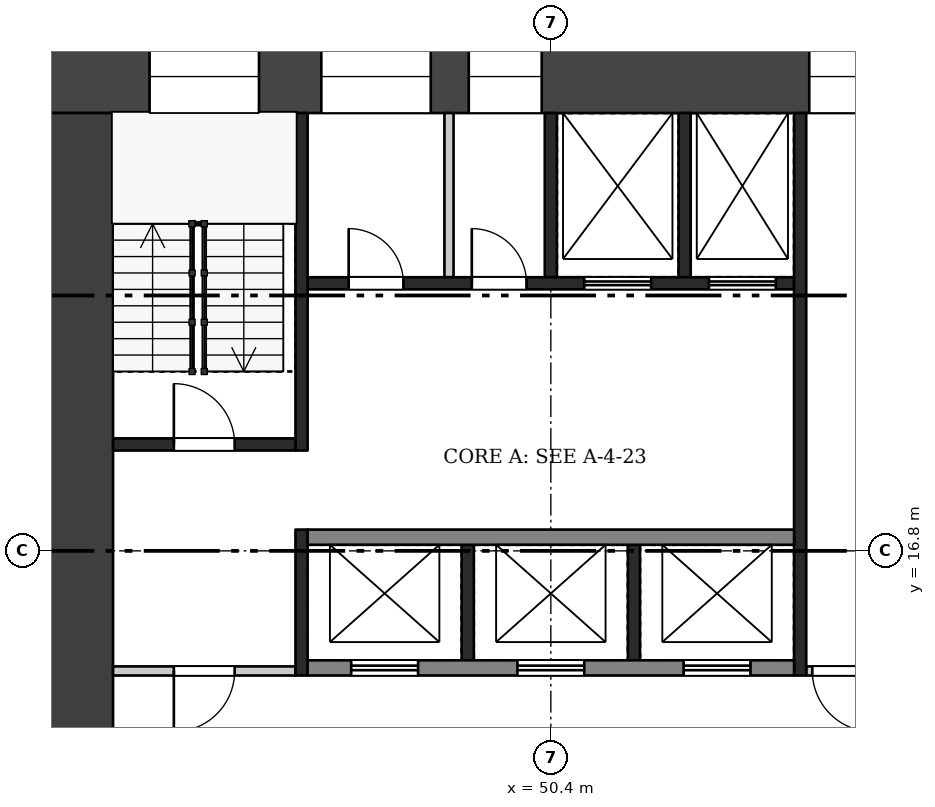
"""IFC4 building model, lengths in metres.
Left out: names, types, materials, properties, quantities, classifications, styles, units other than length and angle.
Written with IfcOpenShell. Run it as: python <this file> out.ifc"""

import sys

from ifc_helpers import new_model, si_unit, direction, frame, frame_2d, origin, place, context, subcontext, project, spatial, rectangle, extrude, element, fill, save


model = new_model("IFC4")
c1 = context("Model", 3, precision=1e-05, world=origin(), true_north=direction((0.0, 1.0)))
c2 = subcontext(c1, "Body", "Model", "MODEL_VIEW")
j1 = project(units=[si_unit("LENGTHUNIT", "METRE"), si_unit("PLANEANGLEUNIT", "RADIAN")], contexts=[c1])
p1 = place(None, origin())
s1 = spatial("IfcSite", under=j1, at=p1, CompositionType="ELEMENT")
p2 = place(p1, origin())
s2 = spatial("IfcBuilding", under=s1, at=p2, CompositionType="ELEMENT")
p3 = place(p2, frame((0.0, 0.0, 147.7)))
s3 = spatial("IfcBuildingStorey", under=s2, at=p3, CompositionType="ELEMENT", Elevation=147.7)
p4 = place(p3, frame((42.0, 24.6, 0.0), z_axis=(0.0, 0.0, 1.0), x_axis=(1.0, 0.0, 0.0)))
e1 = element("IfcWall", 1, at=p4, inside=s3, PredefinedType="SHEAR", context=c2, shape_type="SweptSolid", body=[
    extrude(rectangle(XDim=16.8, YDim=1.2, at=frame_2d((8.4, 0.0))), origin(), (0.0, 0.0, 1.0), 3.22),
])
p5 = place(p4, frame((1.8, 0.0, 0.5)))
e2 = element("IfcOpeningElement", 2, at=p5, cuts=e1, PredefinedType="OPENING", context=c2, shape_type="SweptSolid", body=[
    extrude(rectangle(XDim=1.8, YDim=2.4, at=frame_2d((0.9, 1.2))), frame((0.0, 0.61, 0.0), z_axis=(0.0, -1.0, 0.0), x_axis=(1.0, 0.0, 0.0)), (0.0, 0.0, 1.0), 1.22),
])
p6 = place(p4, frame((4.625, 0.0, 1.6)))
e3 = element("IfcOpeningElement", 3, at=p6, cuts=e1, PredefinedType="OPENING", context=c2, shape_type="SweptSolid", body=[
    extrude(rectangle(XDim=1.8, YDim=1.2, at=frame_2d((0.9, 0.6))), frame((0.0, 0.61, 0.0), z_axis=(0.0, -1.0, 0.0), x_axis=(1.0, 0.0, 0.0)), (0.0, 0.0, 1.0), 1.22),
])
p7 = place(p4, frame((7.05, 0.0, 1.6)))
e4 = element("IfcOpeningElement", 4, at=p7, cuts=e1, PredefinedType="OPENING", context=c2, shape_type="SweptSolid", body=[
    extrude(rectangle(XDim=1.2, YDim=1.2, at=frame_2d((0.6, 0.6))), frame((0.0, 0.61, 0.0), z_axis=(0.0, -1.0, 0.0), x_axis=(1.0, 0.0, 0.0)), (0.0, 0.0, 1.0), 1.22),
])
p8 = place(p4, frame((12.65, 0.0, 0.6)))
e5 = element("IfcOpeningElement", 5, at=p8, cuts=e1, PredefinedType="OPENING", context=c2, shape_type="SweptSolid", body=[
    extrude(rectangle(XDim=1.0, YDim=2.1, at=frame_2d((0.5, 1.05))), frame((0.0, 0.61, 0.0), z_axis=(0.0, -1.0, 0.0), x_axis=(1.0, 0.0, 0.0)), (0.0, 0.0, 1.0), 1.22),
])
p9 = place(p4, frame((14.175, 0.0, 1.6)))
e6 = element("IfcOpeningElement", 6, at=p9, cuts=e1, PredefinedType="OPENING", context=c2, shape_type="SweptSolid", body=[
    extrude(rectangle(XDim=1.2, YDim=1.2, at=frame_2d((0.6, 0.6))), frame((0.0, 0.61, 0.0), z_axis=(0.0, -1.0, 0.0), x_axis=(1.0, 0.0, 0.0)), (0.0, 0.0, 1.0), 1.22),
])
p10 = place(p3, frame((42.6, 9.6, 0.0), z_axis=(0.0, 0.0, 1.0), x_axis=(0.0, 1.0, 0.0)))
e7 = element("IfcWall", 7, at=p10, inside=s3, PredefinedType="SHEAR", context=c2, shape_type="SweptSolid", body=[
    extrude(rectangle(XDim=14.4, YDim=1.2, at=frame_2d((7.2, 0.0))), origin(), (0.0, 0.0, 1.0), 3.22),
])
p11 = place(p10, frame((2.1, 0.0, 0.0)))
e8 = element("IfcOpeningElement", 8, at=p11, cuts=e7, PredefinedType="OPENING", context=c2, shape_type="SweptSolid", body=[
    extrude(rectangle(XDim=1.8, YDim=2.1, at=frame_2d((0.9, 1.05))), frame((0.0, 0.61, 0.0), z_axis=(0.0, -1.0, 0.0), x_axis=(1.0, 0.0, 0.0)), (0.0, 0.0, 1.0), 1.22),
])
for number, where, z_axis, x_axis in (
    (9, (49.033, 15.0, 0.0), (0.0, 0.0, 1.0), (0.0, 1.0, 0.0)),
    (10, (51.767, 15.0, 0.0), (0.0, 0.0, 1.0), (0.0, 1.0, 0.0)),
):
    element("IfcWall", number, at=place(p3, frame(where, z_axis=z_axis, x_axis=x_axis)), inside=s3, PredefinedType="SHEAR", context=c2, shape_type="SweptSolid", body=[
        extrude(rectangle(XDim=1.9, YDim=0.2, at=frame_2d((0.95, 0.0))), origin(), (0.0, 0.0, 1.0), 3.22),
    ])
p12 = place(p3, frame((46.4, 14.875, 0.0), z_axis=(0.0, 0.0, 1.0), x_axis=(1.0, 0.0, 0.0)))
e11 = element("IfcWall", 11, at=p12, inside=s3, PredefinedType="SHEAR", context=c2, shape_type="SweptSolid", body=[
    extrude(rectangle(XDim=8.0, YDim=0.25, at=frame_2d((4.0, 0.0))), origin(), (0.0, 0.0, 1.0), 3.22),
])
p13 = place(p12, frame((0.717, 0.0, 0.0)))
e12 = element("IfcOpeningElement", 12, at=p13, cuts=e11, PredefinedType="OPENING", context=c2, shape_type="SweptSolid", body=[
    extrude(rectangle(XDim=1.1, YDim=2.1, at=frame_2d((0.55, 1.05))), frame((0.0, 0.135, 0.0), z_axis=(0.0, -1.0, 0.0), x_axis=(1.0, 0.0, 0.0)), (0.0, 0.0, 1.0), 0.27),
])
p14 = place(p12, frame((3.45, 0.0, 0.0)))
e13 = element("IfcOpeningElement", 13, at=p14, cuts=e11, PredefinedType="OPENING", context=c2, shape_type="SweptSolid", body=[
    extrude(rectangle(XDim=1.1, YDim=2.1, at=frame_2d((0.55, 1.05))), frame((0.0, 0.135, 0.0), z_axis=(0.0, -1.0, 0.0), x_axis=(1.0, 0.0, 0.0)), (0.0, 0.0, 1.0), 0.27),
])
p15 = place(p12, frame((6.183, 0.0, 0.0)))
e14 = element("IfcOpeningElement", 14, at=p15, cuts=e11, PredefinedType="OPENING", context=c2, shape_type="SweptSolid", body=[
    extrude(rectangle(XDim=1.1, YDim=2.1, at=frame_2d((0.55, 1.05))), frame((0.0, 0.135, 0.0), z_axis=(0.0, -1.0, 0.0), x_axis=(1.0, 0.0, 0.0)), (0.0, 0.0, 1.0), 0.27),
])
p16 = place(p3, frame((46.4, 17.025, 0.0), z_axis=(0.0, 0.0, 1.0), x_axis=(1.0, 0.0, 0.0)))
e15 = element("IfcWall", 15, at=p16, inside=s3, PredefinedType="SHEAR", context=c2, shape_type="SweptSolid", body=[
    extrude(rectangle(XDim=8.0, YDim=0.25, at=frame_2d((4.0, 0.0))), origin(), (0.0, 0.0, 1.0), 3.22),
])
for number, where, z_axis, x_axis in (
    (16, (50.4, 21.3, 0.0), (0.0, 0.0, 1.0), (0.0, 1.0, 0.0)),
    (17, (52.6, 21.3, 0.0), (0.0, 0.0, 1.0), (0.0, 1.0, 0.0)),
):
    element("IfcWall", number, at=place(p3, frame(where, z_axis=z_axis, x_axis=x_axis)), inside=s3, PredefinedType="SHEAR", context=c2, shape_type="SweptSolid", body=[
        extrude(rectangle(XDim=2.7, YDim=0.2, at=frame_2d((1.35, 0.0))), origin(), (0.0, 0.0, 1.0), 3.22),
    ])
p17 = place(p3, frame((48.725, 21.3, 0.0), z_axis=(0.0, 0.0, 1.0), x_axis=(0.0, 1.0, 0.0)))
e18 = element("IfcWall", 18, at=p17, inside=s3, PredefinedType="PARTITIONING", context=c2, shape_type="SweptSolid", body=[
    extrude(rectangle(XDim=2.7, YDim=0.15, at=frame_2d((1.35, 0.0))), origin(), (0.0, 0.0, 1.0), 3.22),
])
p18 = place(p3, frame((46.4, 21.2, 0.0), z_axis=(0.0, 0.0, 1.0), x_axis=(1.0, 0.0, 0.0)))
e19 = element("IfcWall", 19, at=p18, inside=s3, PredefinedType="SHEAR", context=c2, shape_type="SweptSolid", body=[
    extrude(rectangle(XDim=8.0, YDim=0.2, at=frame_2d((4.0, 0.0))), origin(), (0.0, 0.0, 1.0), 3.22),
])
p19 = place(p18, frame((0.675, 0.0, 0.0)))
e20 = element("IfcOpeningElement", 20, at=p19, cuts=e19, PredefinedType="OPENING", context=c2, shape_type="SweptSolid", body=[
    extrude(rectangle(XDim=0.9, YDim=2.1, at=frame_2d((0.45, 1.05))), frame((0.0, 0.11, 0.0), z_axis=(0.0, -1.0, 0.0), x_axis=(1.0, 0.0, 0.0)), (0.0, 0.0, 1.0), 0.22),
])
p20 = place(p18, frame((2.7, 0.0, 0.0)))
e21 = element("IfcOpeningElement", 21, at=p20, cuts=e19, PredefinedType="OPENING", context=c2, shape_type="SweptSolid", body=[
    extrude(rectangle(XDim=0.9, YDim=2.1, at=frame_2d((0.45, 1.05))), frame((0.0, 0.11, 0.0), z_axis=(0.0, -1.0, 0.0), x_axis=(1.0, 0.0, 0.0)), (0.0, 0.0, 1.0), 0.22),
])
p21 = place(p18, frame((4.55, 0.0, 0.0)))
e22 = element("IfcOpeningElement", 22, at=p21, cuts=e19, PredefinedType="OPENING", context=c2, shape_type="SweptSolid", body=[
    extrude(rectangle(XDim=1.1, YDim=2.1, at=frame_2d((0.55, 1.05))), frame((0.0, 0.11, 0.0), z_axis=(0.0, -1.0, 0.0), x_axis=(1.0, 0.0, 0.0)), (0.0, 0.0, 1.0), 0.22),
])
p22 = place(p18, frame((6.6, 0.0, 0.0)))
e23 = element("IfcOpeningElement", 23, at=p22, cuts=e19, PredefinedType="OPENING", context=c2, shape_type="SweptSolid", body=[
    extrude(rectangle(XDim=1.1, YDim=2.1, at=frame_2d((0.55, 1.05))), frame((0.0, 0.11, 0.0), z_axis=(0.0, -1.0, 0.0), x_axis=(1.0, 0.0, 0.0)), (0.0, 0.0, 1.0), 0.22),
])
p23 = place(p3, frame((46.3, 14.75, 0.0), z_axis=(0.0, 0.0, 1.0), x_axis=(0.0, 1.0, 0.0)))
e24 = element("IfcWall", 24, at=p23, inside=s3, PredefinedType="SHEAR", context=c2, shape_type="SweptSolid", body=[
    extrude(rectangle(XDim=2.4, YDim=0.2, at=frame_2d((1.2, 0.0))), origin(), (0.0, 0.0, 1.0), 3.22),
])
p24 = place(p3, frame((46.3, 18.45, 0.0), z_axis=(0.0, 0.0, 1.0), x_axis=(0.0, 1.0, 0.0)))
e25 = element("IfcWall", 25, at=p24, inside=s3, PredefinedType="SHEAR", context=c2, shape_type="SweptSolid", body=[
    extrude(rectangle(XDim=5.55, YDim=0.2, at=frame_2d((2.775, 0.0))), origin(), (0.0, 0.0, 1.0), 3.22),
])
p25 = place(p3, frame((43.2, 14.825, 0.0), z_axis=(0.0, 0.0, 1.0), x_axis=(1.0, 0.0, 0.0)))
e26 = element("IfcWall", 26, at=p25, inside=s3, PredefinedType="PARTITIONING", context=c2, shape_type="SweptSolid", body=[
    extrude(rectangle(XDim=3.0, YDim=0.15, at=frame_2d((1.5, 0.0))), origin(), (0.0, 0.0, 1.0), 3.22),
])
p26 = place(p25, frame((1.0, 0.0, 0.0)))
e27 = element("IfcOpeningElement", 27, at=p26, cuts=e26, PredefinedType="OPENING", context=c2, shape_type="SweptSolid", body=[
    extrude(rectangle(XDim=1.0, YDim=2.1, at=frame_2d((0.5, 1.05))), frame((0.0, 0.085, 0.0), z_axis=(0.0, -1.0, 0.0), x_axis=(1.0, 0.0, 0.0)), (0.0, 0.0, 1.0), 0.17),
])
p27 = place(p3, frame((43.2, 18.55, 0.0), z_axis=(0.0, 0.0, 1.0), x_axis=(1.0, 0.0, 0.0)))
e28 = element("IfcWall", 28, at=p27, inside=s3, PredefinedType="SHEAR", context=c2, shape_type="SweptSolid", body=[
    extrude(rectangle(XDim=3.0, YDim=0.2, at=frame_2d((1.5, 0.0))), origin(), (0.0, 0.0, 1.0), 3.22),
])
p28 = place(p27, frame((1.0, 0.0, 0.0)))
e29 = element("IfcOpeningElement", 29, at=p28, cuts=e28, PredefinedType="OPENING", context=c2, shape_type="SweptSolid", body=[
    extrude(rectangle(XDim=1.0, YDim=2.1, at=frame_2d((0.5, 1.05))), frame((0.0, 0.11, 0.0), z_axis=(0.0, -1.0, 0.0), x_axis=(1.0, 0.0, 0.0)), (0.0, 0.0, 1.0), 0.22),
])
p29 = place(p3, frame((54.5, 14.75, 0.0), z_axis=(0.0, 0.0, 1.0), x_axis=(0.0, 1.0, 0.0)))
e30 = element("IfcWall", 30, at=p29, inside=s3, PredefinedType="SHEAR", context=c2, shape_type="SweptSolid", body=[
    extrude(rectangle(XDim=9.25, YDim=0.2, at=frame_2d((4.625, 0.0))), origin(), (0.0, 0.0, 1.0), 3.22),
])
p30 = place(p3, frame((54.6, 14.825, 0.0), z_axis=(0.0, 0.0, 1.0), x_axis=(1.0, 0.0, 0.0)))
e31 = element("IfcWall", 31, at=p30, inside=s3, PredefinedType="PARTITIONING", context=c2, shape_type="SweptSolid", body=[
    extrude(rectangle(XDim=3.0, YDim=0.15, at=frame_2d((1.5, 0.0))), origin(), (0.0, 0.0, 1.0), 3.22),
])
p31 = place(p30, frame((0.1, 0.0, 0.0)))
e32 = element("IfcOpeningElement", 32, at=p31, cuts=e31, PredefinedType="OPENING", context=c2, shape_type="SweptSolid", body=[
    extrude(rectangle(XDim=1.0, YDim=2.1, at=frame_2d((0.5, 1.05))), frame((0.0, 0.085, 0.0), z_axis=(0.0, -1.0, 0.0), x_axis=(1.0, 0.0, 0.0)), (0.0, 0.0, 1.0), 0.17),
])
p32 = place(p13, origin())
e33 = element("IfcDoor", 33, at=p32, inside=s3, OperationType="DOUBLE_DOOR_SLIDING", PredefinedType="DOOR", context=c2, shape_type="SweptSolid", body=[
    extrude(rectangle(XDim=1.1, YDim=2.1, at=frame_2d((0.55, 1.05))), frame((0.0, 0.025, 0.0), z_axis=(0.0, -1.0, 0.0), x_axis=(1.0, 0.0, 0.0)), (0.0, 0.0, 1.0), 0.05),
])
fill(e12, e33)
p33 = place(p14, origin())
e34 = element("IfcDoor", 34, at=p33, inside=s3, OperationType="DOUBLE_DOOR_SLIDING", PredefinedType="DOOR", context=c2, shape_type="SweptSolid", body=[
    extrude(rectangle(XDim=1.1, YDim=2.1, at=frame_2d((0.55, 1.05))), frame((0.0, 0.025, 0.0), z_axis=(0.0, -1.0, 0.0), x_axis=(1.0, 0.0, 0.0)), (0.0, 0.0, 1.0), 0.05),
])
fill(e13, e34)
p34 = place(p15, origin())
e35 = element("IfcDoor", 35, at=p34, inside=s3, OperationType="DOUBLE_DOOR_SLIDING", PredefinedType="DOOR", context=c2, shape_type="SweptSolid", body=[
    extrude(rectangle(XDim=1.1, YDim=2.1, at=frame_2d((0.55, 1.05))), frame((0.0, 0.025, 0.0), z_axis=(0.0, -1.0, 0.0), x_axis=(1.0, 0.0, 0.0)), (0.0, 0.0, 1.0), 0.05),
])
fill(e14, e35)
p35 = place(p19, origin())
e36 = element("IfcDoor", 36, at=p35, inside=s3, OperationType="SINGLE_SWING_LEFT", PredefinedType="DOOR", context=c2, shape_type="SweptSolid", body=[
    extrude(rectangle(XDim=0.9, YDim=2.1, at=frame_2d((0.45, 1.05))), frame((0.0, 0.025, 0.0), z_axis=(0.0, -1.0, 0.0), x_axis=(1.0, 0.0, 0.0)), (0.0, 0.0, 1.0), 0.05),
])
fill(e20, e36)
p36 = place(p20, origin())
e37 = element("IfcDoor", 37, at=p36, inside=s3, OperationType="SINGLE_SWING_LEFT", PredefinedType="DOOR", context=c2, shape_type="SweptSolid", body=[
    extrude(rectangle(XDim=0.9, YDim=2.1, at=frame_2d((0.45, 1.05))), frame((0.0, 0.025, 0.0), z_axis=(0.0, -1.0, 0.0), x_axis=(1.0, 0.0, 0.0)), (0.0, 0.0, 1.0), 0.05),
])
fill(e21, e37)
p37 = place(p21, origin())
e38 = element("IfcDoor", 38, at=p37, inside=s3, OperationType="DOUBLE_DOOR_SLIDING", PredefinedType="DOOR", context=c2, shape_type="SweptSolid", body=[
    extrude(rectangle(XDim=1.1, YDim=2.1, at=frame_2d((0.55, 1.05))), frame((0.0, 0.025, 0.0), z_axis=(0.0, -1.0, 0.0), x_axis=(1.0, 0.0, 0.0)), (0.0, 0.0, 1.0), 0.05),
])
fill(e22, e38)
p38 = place(p22, origin())
e39 = element("IfcDoor", 39, at=p38, inside=s3, OperationType="DOUBLE_DOOR_SLIDING", PredefinedType="DOOR", context=c2, shape_type="SweptSolid", body=[
    extrude(rectangle(XDim=1.1, YDim=2.1, at=frame_2d((0.55, 1.05))), frame((0.0, 0.025, 0.0), z_axis=(0.0, -1.0, 0.0), x_axis=(1.0, 0.0, 0.0)), (0.0, 0.0, 1.0), 0.05),
])
fill(e23, e39)
p39 = place(p26, frame((1.0, 0.0, 0.0), z_axis=(0.0, 0.0, 1.0), x_axis=(-1.0, 0.0, 0.0)))
e40 = element("IfcDoor", 40, at=p39, inside=s3, OperationType="SINGLE_SWING_RIGHT", PredefinedType="DOOR", context=c2, shape_type="SweptSolid", body=[
    extrude(rectangle(XDim=1.0, YDim=2.1, at=frame_2d((0.5, 1.05))), frame((0.0, 0.025, 0.0), z_axis=(0.0, -1.0, 0.0), x_axis=(1.0, 0.0, 0.0)), (0.0, 0.0, 1.0), 0.05),
])
fill(e27, e40)
p40 = place(p28, origin())
e41 = element("IfcDoor", 41, at=p40, inside=s3, OperationType="SINGLE_SWING_LEFT", PredefinedType="DOOR", context=c2, shape_type="SweptSolid", body=[
    extrude(rectangle(XDim=1.0, YDim=2.1, at=frame_2d((0.5, 1.05))), frame((0.0, 0.025, 0.0), z_axis=(0.0, -1.0, 0.0), x_axis=(1.0, 0.0, 0.0)), (0.0, 0.0, 1.0), 0.05),
])
fill(e29, e41)
p41 = place(p31, frame((1.0, 0.0, 0.0), z_axis=(0.0, 0.0, 1.0), x_axis=(-1.0, 0.0, 0.0)))
e42 = element("IfcDoor", 42, at=p41, inside=s3, OperationType="SINGLE_SWING_LEFT", PredefinedType="DOOR", context=c2, shape_type="SweptSolid", body=[
    extrude(rectangle(XDim=1.0, YDim=2.1, at=frame_2d((0.5, 1.05))), frame((0.0, 0.025, 0.0), z_axis=(0.0, -1.0, 0.0), x_axis=(1.0, 0.0, 0.0)), (0.0, 0.0, 1.0), 0.05),
])
fill(e32, e42)
p42 = place(p5, origin())
e43 = element("IfcWindow", 43, at=p42, inside=s3, PartitioningType="SINGLE_PANEL", PredefinedType="WINDOW", context=c2, shape_type="SweptSolid", body=[
    extrude(rectangle(XDim=1.8, YDim=2.4, at=frame_2d((0.9, 1.2))), frame((0.0, 0.03, 0.0), z_axis=(0.0, -1.0, 0.0), x_axis=(1.0, 0.0, 0.0)), (0.0, 0.0, 1.0), 0.06),
])
fill(e2, e43)
p43 = place(p6, origin())
e44 = element("IfcWindow", 44, at=p43, inside=s3, PartitioningType="SINGLE_PANEL", PredefinedType="WINDOW", context=c2, shape_type="SweptSolid", body=[
    extrude(rectangle(XDim=1.8, YDim=1.2, at=frame_2d((0.9, 0.6))), frame((0.0, 0.03, 0.0), z_axis=(0.0, -1.0, 0.0), x_axis=(1.0, 0.0, 0.0)), (0.0, 0.0, 1.0), 0.06),
])
fill(e3, e44)
p44 = place(p7, origin())
e45 = element("IfcWindow", 45, at=p44, inside=s3, PartitioningType="SINGLE_PANEL", PredefinedType="WINDOW", context=c2, shape_type="SweptSolid", body=[
    extrude(rectangle(XDim=1.2, YDim=1.2, at=frame_2d((0.6, 0.6))), frame((0.0, 0.03, 0.0), z_axis=(0.0, -1.0, 0.0), x_axis=(1.0, 0.0, 0.0)), (0.0, 0.0, 1.0), 0.06),
])
fill(e4, e45)
p45 = place(p8, origin())
e46 = element("IfcWindow", 46, at=p45, inside=s3, PartitioningType="SINGLE_PANEL", PredefinedType="WINDOW", context=c2, shape_type="SweptSolid", body=[
    extrude(rectangle(XDim=1.0, YDim=2.1, at=frame_2d((0.5, 1.05))), frame((0.0, 0.03, 0.0), z_axis=(0.0, -1.0, 0.0), x_axis=(1.0, 0.0, 0.0)), (0.0, 0.0, 1.0), 0.06),
])
fill(e5, e46)
save(model, sys.argv[1])
